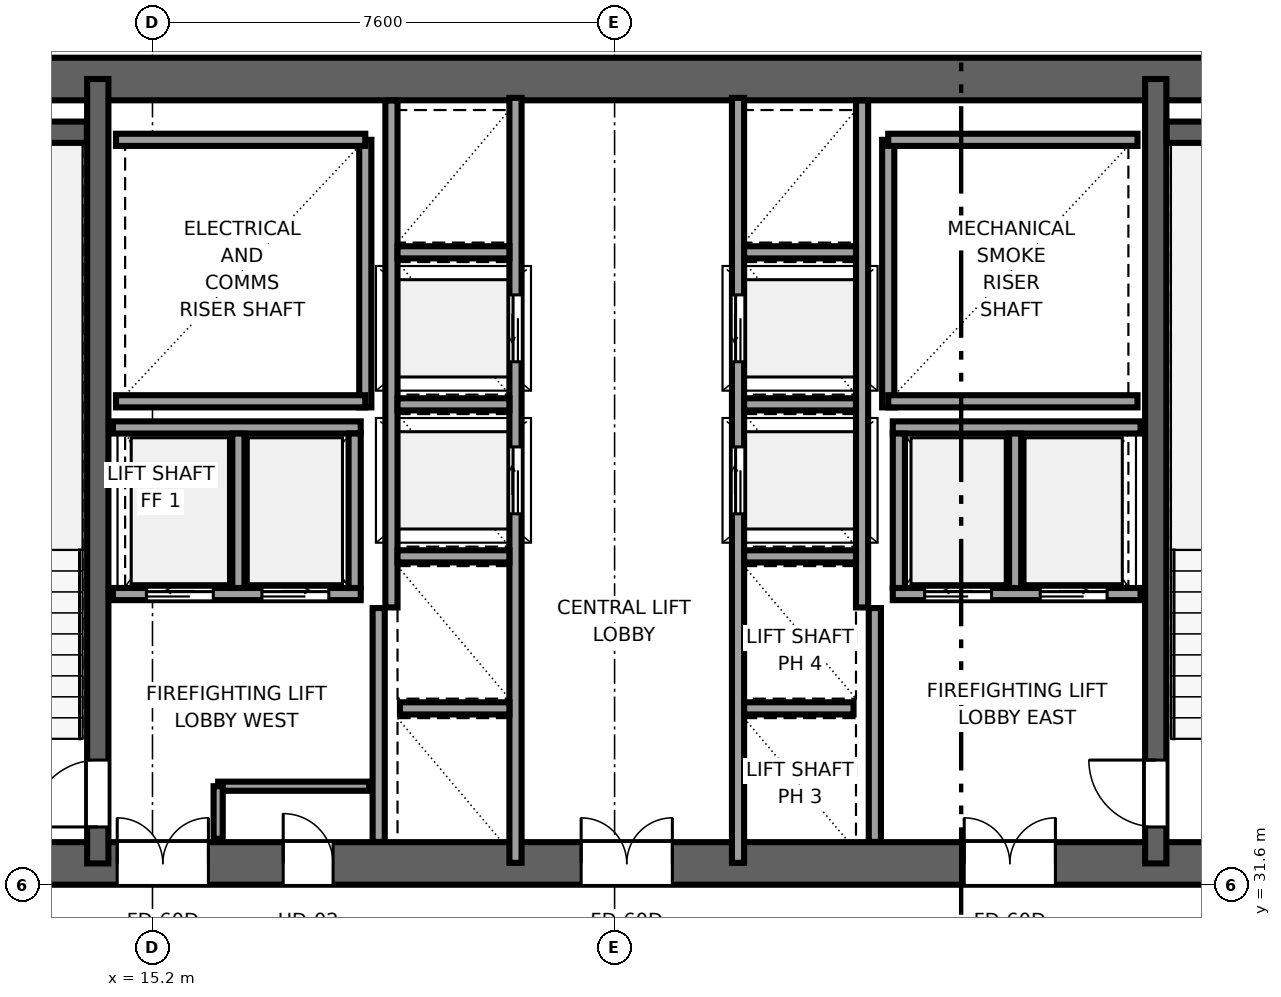
"""IFC4 building model, lengths in metres.
Left out: names, types, materials, properties, quantities, classifications, styles, units other than length and angle.
Written with IfcOpenShell. Run it as: python <this file> out.ifc"""

import sys

from ifc_helpers import new_model, si_unit, direction, frame, frame_2d, origin, place, context, subcontext, project, spatial, rectangle, extrude, source, transform, mapped, element, fill, save


model = new_model("IFC4")
c1 = context("Model", 3, precision=1e-05, world=origin(), true_north=direction((0.0, 1.0)))
c2 = subcontext(c1, "Body", "Model", "MODEL_VIEW")
j1 = project(units=[si_unit("LENGTHUNIT", "METRE"), si_unit("PLANEANGLEUNIT", "RADIAN")], contexts=[c1])
p1 = place(None, origin())
s1 = spatial("IfcSite", under=j1, at=p1, CompositionType="ELEMENT")
p2 = place(p1, origin())
s2 = spatial("IfcBuilding", under=s1, at=p2, CompositionType="ELEMENT")
p3 = place(p2, frame((0.0, 0.0, 122.2)))
s3 = spatial("IfcBuildingStorey", under=s2, at=p3, CompositionType="ELEMENT", Elevation=122.2)
p4 = place(p3, frame((9.8, 31.95, 0.0), z_axis=(0.0, 0.0, 1.0), x_axis=(1.0, 0.0, 0.0)))
e1 = element("IfcWall", 1, at=p4, inside=s3, PredefinedType="SHEAR", context=c2, shape_type="SweptSolid", body=[
    extrude(rectangle(XDim=26.4, YDim=0.7, at=frame_2d((13.2, 0.0))), origin(), (0.0, 0.0, 1.0), 3.55),
])
p5 = place(p4, frame((6.32, 0.0, 0.0), z_axis=(0.0, 0.0, 1.0), x_axis=(-1.0, 0.0, 0.0)))
e2 = element("IfcOpeningElement", 2, at=p5, cuts=e1, PredefinedType="OPENING", context=c2, shape_type="SweptSolid", body=[
    extrude(rectangle(XDim=1.5, YDim=2.04, at=frame_2d((0.75, 1.02))), frame((0.0, 0.36, 0.0), z_axis=(0.0, -1.0, 0.0), x_axis=(1.0, 0.0, 0.0)), (0.0, 0.0, 1.0), 0.72),
])
p6 = place(p4, frame((13.95, 0.0, 0.0), z_axis=(0.0, 0.0, 1.0), x_axis=(-1.0, 0.0, 0.0)))
e3 = element("IfcOpeningElement", 3, at=p6, cuts=e1, PredefinedType="OPENING", context=c2, shape_type="SweptSolid", body=[
    extrude(rectangle(XDim=1.5, YDim=2.04, at=frame_2d((0.75, 1.02))), frame((0.0, 0.36, 0.0), z_axis=(0.0, -1.0, 0.0), x_axis=(1.0, 0.0, 0.0)), (0.0, 0.0, 1.0), 0.72),
])
p7 = place(p4, frame((20.25, 0.0, 0.0), z_axis=(0.0, 0.0, 1.0), x_axis=(-1.0, 0.0, 0.0)))
e4 = element("IfcOpeningElement", 4, at=p7, cuts=e1, PredefinedType="OPENING", context=c2, shape_type="SweptSolid", body=[
    extrude(rectangle(XDim=1.5, YDim=2.04, at=frame_2d((0.75, 1.02))), frame((0.0, 0.36, 0.0), z_axis=(0.0, -1.0, 0.0), x_axis=(1.0, 0.0, 0.0)), (0.0, 0.0, 1.0), 0.72),
])
p8 = place(p4, frame((8.37, 0.0, 0.0), z_axis=(0.0, 0.0, 1.0), x_axis=(-1.0, 0.0, 0.0)))
e5 = element("IfcOpeningElement", 5, at=p8, cuts=e1, PredefinedType="OPENING", context=c2, shape_type="SweptSolid", body=[
    extrude(rectangle(XDim=0.82, YDim=2.01, at=frame_2d((0.41, 1.005))), frame((0.0, 0.36, 0.0), z_axis=(0.0, -1.0, 0.0), x_axis=(1.0, 0.0, 0.0)), (0.0, 0.0, 1.0), 0.72),
])
p9 = place(p3, frame((9.8, 44.85, 0.0), z_axis=(0.0, 0.0, 1.0), x_axis=(1.0, 0.0, 0.0)))
e6 = element("IfcWall", 6, at=p9, inside=s3, PredefinedType="SHEAR", context=c2, shape_type="SweptSolid", body=[
    extrude(rectangle(XDim=26.4, YDim=0.7, at=frame_2d((13.2, 0.0))), origin(), (0.0, 0.0, 1.0), 3.55),
])
p10 = place(p3, frame((14.3, 31.95, 0.0), z_axis=(0.0, 0.0, 1.0), x_axis=(0.0, 1.0, 0.0)))
e7 = element("IfcWall", 7, at=p10, inside=s3, PredefinedType="SHEAR", context=c2, shape_type="SweptSolid", body=[
    extrude(rectangle(XDim=12.9, YDim=0.35, at=frame_2d((6.45, 0.0))), origin(), (0.0, 0.0, 1.0), 3.55),
])
p11 = place(p10, frame((0.6, 0.0, 0.0)))
e8 = element("IfcOpeningElement", 8, at=p11, cuts=e7, PredefinedType="OPENING", context=c2, shape_type="SweptSolid", body=[
    extrude(rectangle(XDim=1.1, YDim=2.12, at=frame_2d((0.55, 1.06))), frame((0.0, 0.185, 0.0), z_axis=(0.0, -1.0, 0.0), x_axis=(1.0, 0.0, 0.0)), (0.0, 0.0, 1.0), 0.37),
])
p12 = place(p3, frame((31.7, 31.95, 0.0), z_axis=(0.0, 0.0, 1.0), x_axis=(0.0, 1.0, 0.0)))
e9 = element("IfcWall", 9, at=p12, inside=s3, PredefinedType="SHEAR", context=c2, shape_type="SweptSolid", body=[
    extrude(rectangle(XDim=12.9, YDim=0.35, at=frame_2d((6.45, 0.0))), origin(), (0.0, 0.0, 1.0), 3.55),
])
p13 = place(p12, frame((1.7, 0.0, 0.0), z_axis=(0.0, 0.0, 1.0), x_axis=(-1.0, 0.0, 0.0)))
e10 = element("IfcOpeningElement", 10, at=p13, cuts=e9, PredefinedType="OPENING", context=c2, shape_type="SweptSolid", body=[
    extrude(rectangle(XDim=1.1, YDim=2.12, at=frame_2d((0.55, 1.06))), frame((0.0, 0.185, 0.0), z_axis=(0.0, -1.0, 0.0), x_axis=(1.0, 0.0, 0.0)), (0.0, 0.0, 1.0), 0.37),
])
for number, where, z_axis, x_axis in (
    (11, (10.52, 43.975, 0.0), (0.0, 0.0, 1.0), (1.0, 0.0, 0.0)),
    (12, (31.88, 43.975, 0.0), (0.0, 0.0, 1.0), (1.0, 0.0, 0.0)),
):
    element("IfcWall", number, at=place(p3, frame(where, z_axis=z_axis, x_axis=x_axis)), inside=s3, PredefinedType="SHEAR", context=c2, shape_type="SweptSolid", body=[
        extrude(rectangle(XDim=3.6, YDim=0.35, at=frame_2d((1.8, 0.0))), origin(), (0.0, 0.0, 1.0), 3.55),
    ])
p14 = place(p3, frame((18.7, 39.45, 0.0), z_axis=(0.0, 0.0, 1.0), x_axis=(0.0, 1.0, 0.0)))
e13 = element("IfcWall", 13, at=p14, inside=s3, PredefinedType="SOLIDWALL", context=c2, shape_type="SweptSolid", body=[
    extrude(rectangle(XDim=4.4, YDim=0.2, at=frame_2d((2.2, 0.0))), origin(), (0.0, 0.0, 1.0), 3.37),
])
for number, where, z_axis, x_axis in (
    (14, (14.6, 39.55, 0.0), (0.0, 0.0, 1.0), (1.0, 0.0, 0.0)),
    (15, (14.6, 43.85, 0.0), (0.0, 0.0, 1.0), (1.0, 0.0, 0.0)),
):
    element("IfcWall", number, at=place(p3, frame(where, z_axis=z_axis, x_axis=x_axis)), inside=s3, PredefinedType="SOLIDWALL", context=c2, shape_type="SweptSolid", body=[
        extrude(rectangle(XDim=4.1, YDim=0.2, at=frame_2d((2.05, 0.0))), origin(), (0.0, 0.0, 1.0), 3.37),
    ])
p15 = place(p3, frame((27.3, 39.45, 0.0), z_axis=(0.0, 0.0, 1.0), x_axis=(0.0, 1.0, 0.0)))
e16 = element("IfcWall", 16, at=p15, inside=s3, PredefinedType="SOLIDWALL", context=c2, shape_type="SweptSolid", body=[
    extrude(rectangle(XDim=4.4, YDim=0.2, at=frame_2d((2.2, 0.0))), origin(), (0.0, 0.0, 1.0), 3.37),
])
for number, where, z_axis, x_axis in (
    (17, (27.3, 39.55, 0.0), (0.0, 0.0, 1.0), (1.0, 0.0, 0.0)),
    (18, (27.3, 43.85, 0.0), (0.0, 0.0, 1.0), (1.0, 0.0, 0.0)),
):
    element("IfcWall", number, at=place(p3, frame(where, z_axis=z_axis, x_axis=x_axis)), inside=s3, PredefinedType="SOLIDWALL", context=c2, shape_type="SweptSolid", body=[
        extrude(rectangle(XDim=4.1, YDim=0.2, at=frame_2d((2.05, 0.0))), origin(), (0.0, 0.0, 1.0), 3.37),
    ])
for number, where, z_axis, x_axis in (
    (19, (18.92, 32.304, 0.0), (0.0, 0.0, 1.0), (0.0, 1.0, 0.0)),
    (20, (27.08, 32.304, 0.0), (0.0, 0.0, 1.0), (0.0, 1.0, 0.0)),
):
    element("IfcWall", number, at=place(p3, frame(where, z_axis=z_axis, x_axis=x_axis)), inside=s3, PredefinedType="SOLIDWALL", context=c2, shape_type="SweptSolid", body=[
        extrude(rectangle(XDim=3.846, YDim=0.2, at=frame_2d((1.923, 0.0))), origin(), (0.0, 0.0, 1.0), 3.37),
    ])
p16 = place(p3, frame((21.17, 31.96, 0.0), z_axis=(0.0, 0.0, 1.0), x_axis=(0.0, 1.0, 0.0)))
e21 = element("IfcWall", 21, at=p16, inside=s3, PredefinedType="SOLIDWALL", context=c2, shape_type="SweptSolid", body=[
    extrude(rectangle(XDim=12.58, YDim=0.2, at=frame_2d((6.29, 0.0))), origin(), (0.0, 0.0, 1.0), 3.37),
])
p17 = place(p16, frame((5.74, 0.0, 0.0)))
e22 = element("IfcOpeningElement", 22, at=p17, cuts=e21, PredefinedType="OPENING", context=c2, shape_type="SweptSolid", body=[
    extrude(rectangle(XDim=1.1, YDim=2.12, at=frame_2d((0.55, 1.06))), frame((0.0, 0.11, 0.0), z_axis=(0.0, -1.0, 0.0), x_axis=(1.0, 0.0, 0.0)), (0.0, 0.0, 1.0), 0.22),
])
p18 = place(p16, frame((8.24, 0.0, 0.0)))
e23 = element("IfcOpeningElement", 23, at=p18, cuts=e21, PredefinedType="OPENING", context=c2, shape_type="SweptSolid", body=[
    extrude(rectangle(XDim=1.1, YDim=2.12, at=frame_2d((0.55, 1.06))), frame((0.0, 0.11, 0.0), z_axis=(0.0, -1.0, 0.0), x_axis=(1.0, 0.0, 0.0)), (0.0, 0.0, 1.0), 0.22),
])
p19 = place(p3, frame((19.13, 36.16, 0.0), z_axis=(0.0, 0.0, 1.0), x_axis=(0.0, 1.0, 0.0)))
e24 = element("IfcWall", 24, at=p19, inside=s3, PredefinedType="SOLIDWALL", context=c2, shape_type="SweptSolid", body=[
    extrude(rectangle(XDim=8.336, YDim=0.2, at=frame_2d((4.168, 0.0))), origin(), (0.0, 0.0, 1.0), 3.37),
])
p20 = place(p3, frame((19.27, 34.5, 0.0), z_axis=(0.0, 0.0, 1.0), x_axis=(1.0, 0.0, 0.0)))
e25 = element("IfcWall", 25, at=p20, inside=s3, PredefinedType="SOLIDWALL", context=c2, shape_type="SweptSolid", body=[
    extrude(rectangle(XDim=1.8, YDim=0.2, at=frame_2d((0.9, 0.0))), origin(), (0.0, 0.0, 1.0), 3.37),
])
for number, where, z_axis, x_axis in (
    (26, (19.23, 37.0, 0.0), (0.0, 0.0, 1.0), (1.0, 0.0, 0.0)),
    (27, (19.23, 39.5, 0.0), (0.0, 0.0, 1.0), (1.0, 0.0, 0.0)),
    (28, (19.23, 42.0, 0.0), (0.0, 0.0, 1.0), (1.0, 0.0, 0.0)),
):
    element("IfcWall", number, at=place(p3, frame(where, z_axis=z_axis, x_axis=x_axis)), inside=s3, PredefinedType="SOLIDWALL", context=c2, shape_type="SweptSolid", body=[
        extrude(rectangle(XDim=1.84, YDim=0.2, at=frame_2d((0.92, 0.0))), origin(), (0.0, 0.0, 1.0), 3.37),
    ])
p21 = place(p3, frame((27.375, 36.38, 0.0), z_axis=(0.0, 0.0, 1.0), x_axis=(1.0, 0.0, 0.0)))
e29 = element("IfcWall", 29, at=p21, inside=s3, PredefinedType="SOLIDWALL", context=c2, shape_type="SweptSolid", body=[
    extrude(rectangle(XDim=4.075, YDim=0.2, at=frame_2d((2.038, 0.0))), origin(), (0.0, 0.0, 1.0), 3.37),
])
p22 = place(p21, frame((0.525, 0.0, 0.0)))
e30 = element("IfcOpeningElement", 30, at=p22, cuts=e29, PredefinedType="OPENING", context=c2, shape_type="SweptSolid", body=[
    extrude(rectangle(XDim=1.1, YDim=2.12, at=frame_2d((0.55, 1.06))), frame((0.0, 0.11, 0.0), z_axis=(0.0, -1.0, 0.0), x_axis=(1.0, 0.0, 0.0)), (0.0, 0.0, 1.0), 0.22),
])
p23 = place(p21, frame((2.425, 0.0, 0.0)))
e31 = element("IfcOpeningElement", 31, at=p23, cuts=e29, PredefinedType="OPENING", context=c2, shape_type="SweptSolid", body=[
    extrude(rectangle(XDim=1.1, YDim=2.12, at=frame_2d((0.55, 1.06))), frame((0.0, 0.11, 0.0), z_axis=(0.0, -1.0, 0.0), x_axis=(1.0, 0.0, 0.0)), (0.0, 0.0, 1.0), 0.22),
])
p24 = place(p3, frame((27.375, 39.12, 0.0), z_axis=(0.0, 0.0, 1.0), x_axis=(1.0, 0.0, 0.0)))
e32 = element("IfcWall", 32, at=p24, inside=s3, PredefinedType="SOLIDWALL", context=c2, shape_type="SweptSolid", body=[
    extrude(rectangle(XDim=4.075, YDim=0.2, at=frame_2d((2.038, 0.0))), origin(), (0.0, 0.0, 1.0), 3.37),
])
for number, where, z_axis, x_axis in (
    (33, (27.475, 36.48, 0.0), (0.0, 0.0, 1.0), (0.0, 1.0, 0.0)),
    (34, (29.387, 36.48, 0.0), (0.0, 0.0, 1.0), (0.0, 1.0, 0.0)),
):
    element("IfcWall", number, at=place(p3, frame(where, z_axis=z_axis, x_axis=x_axis)), inside=s3, PredefinedType="SOLIDWALL", context=c2, shape_type="SweptSolid", body=[
        extrude(rectangle(XDim=2.54, YDim=0.2, at=frame_2d((1.27, 0.0))), origin(), (0.0, 0.0, 1.0), 3.37),
    ])
p25 = place(p3, frame((14.55, 36.38, 0.0), z_axis=(0.0, 0.0, 1.0), x_axis=(1.0, 0.0, 0.0)))
e35 = element("IfcWall", 35, at=p25, inside=s3, PredefinedType="SOLIDWALL", context=c2, shape_type="SweptSolid", body=[
    extrude(rectangle(XDim=4.075, YDim=0.2, at=frame_2d((2.038, 0.0))), origin(), (0.0, 0.0, 1.0), 3.37),
])
p26 = place(p25, frame((0.55, 0.0, 0.0)))
e36 = element("IfcOpeningElement", 36, at=p26, cuts=e35, PredefinedType="OPENING", context=c2, shape_type="SweptSolid", body=[
    extrude(rectangle(XDim=1.1, YDim=2.12, at=frame_2d((0.55, 1.06))), frame((0.0, 0.11, 0.0), z_axis=(0.0, -1.0, 0.0), x_axis=(1.0, 0.0, 0.0)), (0.0, 0.0, 1.0), 0.22),
])
p27 = place(p25, frame((2.45, 0.0, 0.0)))
e37 = element("IfcOpeningElement", 37, at=p27, cuts=e35, PredefinedType="OPENING", context=c2, shape_type="SweptSolid", body=[
    extrude(rectangle(XDim=1.1, YDim=2.12, at=frame_2d((0.55, 1.06))), frame((0.0, 0.11, 0.0), z_axis=(0.0, -1.0, 0.0), x_axis=(1.0, 0.0, 0.0)), (0.0, 0.0, 1.0), 0.22),
])
p28 = place(p3, frame((14.55, 39.12, 0.0), z_axis=(0.0, 0.0, 1.0), x_axis=(1.0, 0.0, 0.0)))
e38 = element("IfcWall", 38, at=p28, inside=s3, PredefinedType="SOLIDWALL", context=c2, shape_type="SweptSolid", body=[
    extrude(rectangle(XDim=4.075, YDim=0.2, at=frame_2d((2.038, 0.0))), origin(), (0.0, 0.0, 1.0), 3.37),
])
for number, where, z_axis, x_axis in (
    (39, (18.525, 36.48, 0.0), (0.0, 0.0, 1.0), (0.0, 1.0, 0.0)),
    (40, (16.613, 36.48, 0.0), (0.0, 0.0, 1.0), (0.0, 1.0, 0.0)),
):
    element("IfcWall", number, at=place(p3, frame(where, z_axis=z_axis, x_axis=x_axis)), inside=s3, PredefinedType="SOLIDWALL", context=c2, shape_type="SweptSolid", body=[
        extrude(rectangle(XDim=2.54, YDim=0.2, at=frame_2d((1.27, 0.0))), origin(), (0.0, 0.0, 1.0), 3.37),
    ])
p29 = place(p3, frame((24.83, 31.96, 0.0), z_axis=(0.0, 0.0, 1.0), x_axis=(0.0, 1.0, 0.0)))
e41 = element("IfcWall", 41, at=p29, inside=s3, PredefinedType="SOLIDWALL", context=c2, shape_type="SweptSolid", body=[
    extrude(rectangle(XDim=12.58, YDim=0.2, at=frame_2d((6.29, 0.0))), origin(), (0.0, 0.0, 1.0), 3.37),
])
p30 = place(p29, frame((5.74, 0.0, 0.0)))
e42 = element("IfcOpeningElement", 42, at=p30, cuts=e41, PredefinedType="OPENING", context=c2, shape_type="SweptSolid", body=[
    extrude(rectangle(XDim=1.1, YDim=2.12, at=frame_2d((0.55, 1.06))), frame((0.0, 0.11, 0.0), z_axis=(0.0, -1.0, 0.0), x_axis=(1.0, 0.0, 0.0)), (0.0, 0.0, 1.0), 0.22),
])
p31 = place(p29, frame((8.24, 0.0, 0.0)))
e43 = element("IfcOpeningElement", 43, at=p31, cuts=e41, PredefinedType="OPENING", context=c2, shape_type="SweptSolid", body=[
    extrude(rectangle(XDim=1.1, YDim=2.12, at=frame_2d((0.55, 1.06))), frame((0.0, 0.11, 0.0), z_axis=(0.0, -1.0, 0.0), x_axis=(1.0, 0.0, 0.0)), (0.0, 0.0, 1.0), 0.22),
])
p32 = place(p3, frame((26.87, 36.16, 0.0), z_axis=(0.0, 0.0, 1.0), x_axis=(0.0, 1.0, 0.0)))
e44 = element("IfcWall", 44, at=p32, inside=s3, PredefinedType="SOLIDWALL", context=c2, shape_type="SweptSolid", body=[
    extrude(rectangle(XDim=8.336, YDim=0.2, at=frame_2d((4.168, 0.0))), origin(), (0.0, 0.0, 1.0), 3.37),
])
p33 = place(p3, frame((24.93, 34.5, 0.0), z_axis=(0.0, 0.0, 1.0), x_axis=(1.0, 0.0, 0.0)))
e45 = element("IfcWall", 45, at=p33, inside=s3, PredefinedType="SOLIDWALL", context=c2, shape_type="SweptSolid", body=[
    extrude(rectangle(XDim=1.8, YDim=0.2, at=frame_2d((0.9, 0.0))), origin(), (0.0, 0.0, 1.0), 3.37),
])
for number, where, z_axis, x_axis in (
    (46, (24.93, 37.0, 0.0), (0.0, 0.0, 1.0), (1.0, 0.0, 0.0)),
    (47, (24.93, 39.5, 0.0), (0.0, 0.0, 1.0), (1.0, 0.0, 0.0)),
    (48, (24.93, 42.0, 0.0), (0.0, 0.0, 1.0), (1.0, 0.0, 0.0)),
):
    element("IfcWall", number, at=place(p3, frame(where, z_axis=z_axis, x_axis=x_axis)), inside=s3, PredefinedType="SOLIDWALL", context=c2, shape_type="SweptSolid", body=[
        extrude(rectangle(XDim=1.84, YDim=0.2, at=frame_2d((0.92, 0.0))), origin(), (0.0, 0.0, 1.0), 3.37),
    ])
p34 = place(p3, frame((16.28, 33.22, 0.0), z_axis=(0.0, 0.0, 1.0), x_axis=(1.0, 0.0, 0.0)))
e49 = element("IfcWall", 49, at=p34, inside=s3, PredefinedType="PARTITIONING", context=c2, shape_type="SweptSolid", body=[
    extrude(rectangle(XDim=2.485, YDim=0.15, at=frame_2d((1.242, 0.0))), origin(), (0.0, 0.0, 1.0), 3.37),
])
p35 = place(p3, frame((16.28, 32.355, 0.0), z_axis=(0.0, 0.0, 1.0), x_axis=(0.0, 1.0, 0.0)))
e50 = element("IfcWall", 50, at=p35, inside=s3, PredefinedType="PARTITIONING", context=c2, shape_type="SweptSolid", body=[
    extrude(rectangle(XDim=0.865, YDim=0.15, at=frame_2d((0.433, 0.0))), origin(), (0.0, 0.0, 1.0), 3.37),
])
m1 = source(origin(), c2, "Body", "SweptSolid", [
    extrude(rectangle(XDim=1.1, YDim=2.12, at=frame_2d((0.55, 1.06))), frame((0.0, 0.025, 0.0), z_axis=(0.0, -1.0, 0.0), x_axis=(1.0, 0.0, 0.0)), (0.0, 0.0, 1.0), 0.05),
])
p36 = place(p11, origin())
e51 = element("IfcDoor", 51, at=p36, inside=s3, OperationType="SINGLE_SWING_LEFT", PredefinedType="DOOR", context=c2, shape_type="MappedRepresentation", body=[
    mapped(m1, transform((0.0, 0.0, 0.0), x_axis=(1.0, 0.0, 0.0), y_axis=(0.0, 1.0, 0.0), z_axis=(0.0, 0.0, 1.0), scale=1.0)),
])
fill(e8, e51)
p37 = place(p13, origin())
e52 = element("IfcDoor", 52, at=p37, inside=s3, OperationType="SINGLE_SWING_RIGHT", PredefinedType="DOOR", context=c2, shape_type="MappedRepresentation", body=[
    mapped(m1, transform((0.0, 0.0, 0.0), x_axis=(1.0, 0.0, 0.0), y_axis=(0.0, 1.0, 0.0), z_axis=(0.0, 0.0, 1.0), scale=1.0)),
])
fill(e10, e52)
m2 = source(origin(), c2, "Body", "SweptSolid", [
    extrude(rectangle(XDim=1.5, YDim=2.04, at=frame_2d((0.75, 1.02))), frame((0.0, 0.025, 0.0), z_axis=(0.0, -1.0, 0.0), x_axis=(1.0, 0.0, 0.0)), (0.0, 0.0, 1.0), 0.05),
])
p38 = place(p5, origin())
e53 = element("IfcDoor", 53, at=p38, inside=s3, OperationType="DOUBLE_DOOR_SINGLE_SWING", PredefinedType="DOOR", context=c2, shape_type="MappedRepresentation", body=[
    mapped(m2, transform((0.0, 0.0, 0.0), x_axis=(1.0, 0.0, 0.0), y_axis=(0.0, 1.0, 0.0), z_axis=(0.0, 0.0, 1.0), scale=1.0)),
])
fill(e2, e53)
p39 = place(p6, origin())
e54 = element("IfcDoor", 54, at=p39, inside=s3, OperationType="DOUBLE_DOOR_SINGLE_SWING", PredefinedType="DOOR", context=c2, shape_type="MappedRepresentation", body=[
    mapped(m2, transform((0.0, 0.0, 0.0), x_axis=(1.0, 0.0, 0.0), y_axis=(0.0, 1.0, 0.0), z_axis=(0.0, 0.0, 1.0), scale=1.0)),
])
fill(e3, e54)
p40 = place(p7, origin())
e55 = element("IfcDoor", 55, at=p40, inside=s3, OperationType="DOUBLE_DOOR_SINGLE_SWING", PredefinedType="DOOR", context=c2, shape_type="MappedRepresentation", body=[
    mapped(m2, transform((0.0, 0.0, 0.0), x_axis=(1.0, 0.0, 0.0), y_axis=(0.0, 1.0, 0.0), z_axis=(0.0, 0.0, 1.0), scale=1.0)),
])
fill(e4, e55)
m3 = source(origin(), c2, "Body", "SweptSolid", [
    extrude(rectangle(XDim=0.82, YDim=2.01, at=frame_2d((0.41, 1.005))), frame((0.0, 0.025, 0.0), z_axis=(0.0, -1.0, 0.0), x_axis=(1.0, 0.0, 0.0)), (0.0, 0.0, 1.0), 0.05),
])
p41 = place(p8, origin())
e56 = element("IfcDoor", 56, at=p41, inside=s3, OperationType="SINGLE_SWING_LEFT", PredefinedType="DOOR", context=c2, shape_type="MappedRepresentation", body=[
    mapped(m3, transform((0.0, 0.0, 0.0), x_axis=(1.0, 0.0, 0.0), y_axis=(0.0, 1.0, 0.0), z_axis=(0.0, 0.0, 1.0), scale=1.0)),
])
fill(e5, e56)
m4 = source(origin(), c2, "Body", "SweptSolid", [
    extrude(rectangle(XDim=1.1, YDim=2.12, at=frame_2d((0.55, 1.06))), frame((0.0, 0.025, 0.0), z_axis=(0.0, -1.0, 0.0), x_axis=(1.0, 0.0, 0.0)), (0.0, 0.0, 1.0), 0.05),
])
p42 = place(p17, origin())
e57 = element("IfcDoor", 57, at=p42, inside=s3, OperationType="SLIDING_TO_RIGHT", PredefinedType="DOOR", context=c2, shape_type="MappedRepresentation", body=[
    mapped(m4, transform((0.0, 0.0, 0.0), x_axis=(1.0, 0.0, 0.0), y_axis=(0.0, 1.0, 0.0), z_axis=(0.0, 0.0, 1.0), scale=1.0)),
])
fill(e22, e57)
p43 = place(p18, origin())
e58 = element("IfcDoor", 58, at=p43, inside=s3, OperationType="SLIDING_TO_LEFT", PredefinedType="DOOR", context=c2, shape_type="MappedRepresentation", body=[
    mapped(m4, transform((0.0, 0.0, 0.0), x_axis=(1.0, 0.0, 0.0), y_axis=(0.0, 1.0, 0.0), z_axis=(0.0, 0.0, 1.0), scale=1.0)),
])
fill(e23, e58)
p44 = place(p22, origin())
e59 = element("IfcDoor", 59, at=p44, inside=s3, OperationType="SLIDING_TO_LEFT", PredefinedType="DOOR", context=c2, shape_type="MappedRepresentation", body=[
    mapped(m4, transform((0.0, 0.0, 0.0), x_axis=(1.0, 0.0, 0.0), y_axis=(0.0, 1.0, 0.0), z_axis=(0.0, 0.0, 1.0), scale=1.0)),
])
fill(e30, e59)
p45 = place(p23, origin())
e60 = element("IfcDoor", 60, at=p45, inside=s3, OperationType="SLIDING_TO_RIGHT", PredefinedType="DOOR", context=c2, shape_type="MappedRepresentation", body=[
    mapped(m4, transform((0.0, 0.0, 0.0), x_axis=(1.0, 0.0, 0.0), y_axis=(0.0, 1.0, 0.0), z_axis=(0.0, 0.0, 1.0), scale=1.0)),
])
fill(e31, e60)
p46 = place(p26, origin())
e61 = element("IfcDoor", 61, at=p46, inside=s3, OperationType="SLIDING_TO_LEFT", PredefinedType="DOOR", context=c2, shape_type="MappedRepresentation", body=[
    mapped(m4, transform((0.0, 0.0, 0.0), x_axis=(1.0, 0.0, 0.0), y_axis=(0.0, 1.0, 0.0), z_axis=(0.0, 0.0, 1.0), scale=1.0)),
])
fill(e36, e61)
p47 = place(p27, origin())
e62 = element("IfcDoor", 62, at=p47, inside=s3, OperationType="SLIDING_TO_RIGHT", PredefinedType="DOOR", context=c2, shape_type="MappedRepresentation", body=[
    mapped(m4, transform((0.0, 0.0, 0.0), x_axis=(1.0, 0.0, 0.0), y_axis=(0.0, 1.0, 0.0), z_axis=(0.0, 0.0, 1.0), scale=1.0)),
])
fill(e37, e62)
p48 = place(p30, origin())
e63 = element("IfcDoor", 63, at=p48, inside=s3, OperationType="SLIDING_TO_RIGHT", PredefinedType="DOOR", context=c2, shape_type="MappedRepresentation", body=[
    mapped(m4, transform((0.0, 0.0, 0.0), x_axis=(1.0, 0.0, 0.0), y_axis=(0.0, 1.0, 0.0), z_axis=(0.0, 0.0, 1.0), scale=1.0)),
])
fill(e42, e63)
p49 = place(p31, origin())
e64 = element("IfcDoor", 64, at=p49, inside=s3, OperationType="SLIDING_TO_LEFT", PredefinedType="DOOR", context=c2, shape_type="MappedRepresentation", body=[
    mapped(m4, transform((0.0, 0.0, 0.0), x_axis=(1.0, 0.0, 0.0), y_axis=(0.0, 1.0, 0.0), z_axis=(0.0, 0.0, 1.0), scale=1.0)),
])
fill(e43, e64)
save(model, sys.argv[1])
